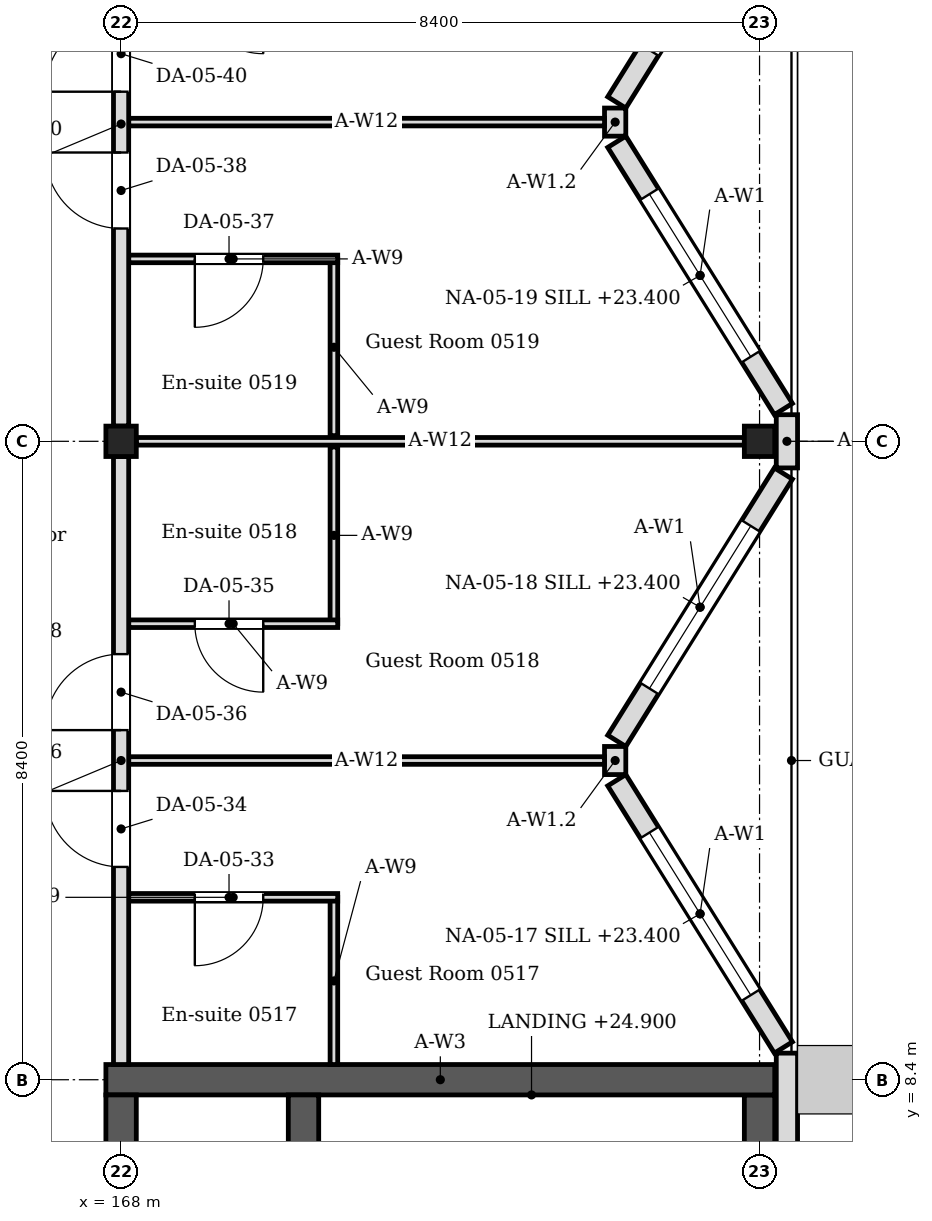
"""IFC4 building model, lengths in metres.
Left out: names, types, materials, properties, quantities, classifications, styles, units other than length and angle.
Written with IfcOpenShell. Run it as: python <this file> out.ifc"""

import sys

from ifc_helpers import new_model, si_unit, direction, frame, frame_2d, origin, origin_2d, place, context, subcontext, project, spatial, rectangle, i_section, extrude, element, fill, save


model = new_model("IFC4")
c1 = context("Model", 3, precision=1e-05, world=origin(), true_north=direction((0.0, 1.0)))
c2 = subcontext(c1, "Body", "Model", "MODEL_VIEW")
j1 = project(units=[si_unit("LENGTHUNIT", "METRE"), si_unit("PLANEANGLEUNIT", "RADIAN")], contexts=[c1])
p1 = place(None, origin())
s1 = spatial("IfcSite", under=j1, at=p1, CompositionType="ELEMENT")
p2 = place(p1, origin())
s2 = spatial("IfcBuilding", under=s1, at=p2, CompositionType="ELEMENT")
p3 = place(p2, frame((0.0, 0.0, 22.8)))
s3 = spatial("IfcBuildingStorey", under=s2, at=p3, CompositionType="ELEMENT", Elevation=22.8)
for number, where, z_axis, x_axis in (
    (1, (168.0, 16.8, 0.0), (0.0, 0.0, 1.0), (1.0, 0.0, 0.0)),
    (2, (176.4, 16.8, 0.0), (0.0, 0.0, 1.0), (1.0, 0.0, 0.0)),
):
    element("IfcColumn", number, at=place(p3, frame(where, z_axis=z_axis, x_axis=x_axis)), inside=s3, PredefinedType="COLUMN", context=c2, shape_type="SweptSolid", body=[
        extrude(i_section(OverallWidth=0.4, OverallDepth=0.4, WebThickness=0.013, FlangeThickness=0.021, FilletRadius=0.022, at=origin_2d()), origin(), (0.0, 0.0, 1.0), 4.2),
    ])
p4 = place(p3, frame((167.8, 8.4, 0.0), z_axis=(0.0, 0.0, 1.0), x_axis=(1.0, 0.0, 0.0)))
e3 = element("IfcWall", 3, at=p4, inside=s3, PredefinedType="SOLIDWALL", context=c2, shape_type="SweptSolid", body=[
    extrude(rectangle(XDim=8.8, YDim=0.4, at=frame_2d((4.4, 0.0))), origin(), (0.0, 0.0, 1.0), 4.05),
])
p5 = place(p3, frame((168.0, 0.2, 0.0), z_axis=(0.0, 0.0, 1.0), x_axis=(0.0, 1.0, 0.0)))
e4 = element("IfcWall", 4, at=p5, inside=s3, PredefinedType="SOLIDWALL", context=c2, shape_type="SweptSolid", body=[
    extrude(rectangle(XDim=8.0, YDim=0.4, at=frame_2d((4.0, 0.0))), origin(), (0.0, 0.0, 1.0), 4.05),
])
p6 = place(p5, frame((1.75, 0.0, 0.0)))
e5 = element("IfcOpeningElement", 5, at=p6, cuts=e4, PredefinedType="OPENING", context=c2, shape_type="SweptSolid", body=[
    extrude(rectangle(XDim=1.0, YDim=2.1, at=frame_2d((0.5, 1.05))), frame((0.0, 0.21, 0.0), z_axis=(0.0, -1.0, 0.0), x_axis=(1.0, 0.0, 0.0)), (0.0, 0.0, 1.0), 0.42),
])
p7 = place(p5, frame((5.675, 0.0, 0.0)))
e6 = element("IfcOpeningElement", 6, at=p7, cuts=e4, PredefinedType="OPENING", context=c2, shape_type="SweptSolid", body=[
    extrude(rectangle(XDim=1.05, YDim=2.1, at=frame_2d((0.525, 1.05))), frame((0.0, 0.21, 0.0), z_axis=(0.0, -1.0, 0.0), x_axis=(1.0, 0.0, 0.0)), (0.0, 0.0, 1.0), 0.42),
])
p8 = place(p3, frame((176.4, 0.2, 0.0), z_axis=(0.0, 0.0, 1.0), x_axis=(0.0, 1.0, 0.0)))
e7 = element("IfcWall", 7, at=p8, inside=s3, PredefinedType="SOLIDWALL", context=c2, shape_type="SweptSolid", body=[
    extrude(rectangle(XDim=8.0, YDim=0.4, at=frame_2d((4.0, 0.0))), origin(), (0.0, 0.0, 1.0), 4.05),
])
p9 = place(p3, frame((176.76, -0.22, 0.0), z_axis=(0.0, 0.0, 1.0), x_axis=(0.0, 1.0, 0.0)))
e8 = element("IfcWall", 8, at=p9, inside=s3, PredefinedType="SOLIDWALL", context=c2, shape_type="SweptSolid", body=[
    extrude(rectangle(XDim=8.97, YDim=0.28, at=frame_2d((4.485, 0.0))), origin(), (0.0, 0.0, 1.0), 4.05),
])
p10 = place(p3, frame((176.714, 8.824, 0.0), z_axis=(0.0, 0.0, 1.0), x_axis=(-0.529018946142, 0.848610013271, 0.0)))
e9 = element("IfcWall", 9, at=p10, inside=s3, PredefinedType="SOLIDWALL", context=c2, shape_type="SweptSolid", body=[
    extrude(rectangle(XDim=4.144, YDim=0.28, at=frame_2d((2.072, 0.0))), origin(), (0.0, 0.0, 1.0), 4.05),
])
p11 = place(p10, frame((0.812, 0.0, 0.6)))
e10 = element("IfcOpeningElement", 10, at=p11, cuts=e9, PredefinedType="OPENING", context=c2, shape_type="SweptSolid", body=[
    extrude(rectangle(XDim=2.52, YDim=2.4, at=frame_2d((1.26, 1.2))), frame((0.0, 0.15, 0.0), z_axis=(0.0, -1.0, 0.0), x_axis=(1.0, 0.0, 0.0)), (0.0, 0.0, 1.0), 0.3),
])
p12 = place(p3, frame((174.521, 12.859, 0.0), z_axis=(0.0, 0.0, 1.0), x_axis=(0.528992500338, 0.848626498871, 0.0)))
e11 = element("IfcWall", 11, at=p12, inside=s3, PredefinedType="SOLIDWALL", context=c2, shape_type="SweptSolid", body=[
    extrude(rectangle(XDim=4.145, YDim=0.28, at=frame_2d((2.072, 0.0))), origin(), (0.0, 0.0, 1.0), 4.05),
])
p13 = place(p12, frame((0.812, 0.0, 0.6)))
e12 = element("IfcOpeningElement", 12, at=p13, cuts=e11, PredefinedType="OPENING", context=c2, shape_type="SweptSolid", body=[
    extrude(rectangle(XDim=2.52, YDim=2.4, at=frame_2d((1.26, 1.2))), frame((0.0, 0.15, 0.0), z_axis=(0.0, -1.0, 0.0), x_axis=(1.0, 0.0, 0.0)), (0.0, 0.0, 1.0), 0.3),
])
p14 = place(p3, frame((174.5, 12.415, 0.0), z_axis=(0.0, 0.0, 1.0), x_axis=(0.0, 1.0, 0.0)))
e13 = element("IfcWall", 13, at=p14, inside=s3, PredefinedType="SOLIDWALL", context=c2, shape_type="SweptSolid", body=[
    extrude(rectangle(XDim=0.37, YDim=0.28, at=frame_2d((0.185, 0.0))), origin(), (0.0, 0.0, 1.0), 3.604),
])
p15 = place(p3, frame((176.76, 16.45, 0.0), z_axis=(0.0, 0.0, 1.0), x_axis=(0.0, 1.0, 0.0)))
e14 = element("IfcWall", 14, at=p15, inside=s3, PredefinedType="SOLIDWALL", context=c2, shape_type="SweptSolid", body=[
    extrude(rectangle(XDim=0.7, YDim=0.28, at=frame_2d((0.35, 0.0))), origin(), (0.0, 0.0, 1.0), 4.05),
])
p16 = place(p3, frame((176.714, 17.224, 0.0), z_axis=(0.0, 0.0, 1.0), x_axis=(-0.529018946142, 0.848610013271, 0.0)))
e15 = element("IfcWall", 15, at=p16, inside=s3, PredefinedType="SOLIDWALL", context=c2, shape_type="SweptSolid", body=[
    extrude(rectangle(XDim=4.144, YDim=0.28, at=frame_2d((2.072, 0.0))), origin(), (0.0, 0.0, 1.0), 4.05),
])
p17 = place(p16, frame((0.812, 0.0, 0.6)))
e16 = element("IfcOpeningElement", 16, at=p17, cuts=e15, PredefinedType="OPENING", context=c2, shape_type="SweptSolid", body=[
    extrude(rectangle(XDim=2.52, YDim=2.4, at=frame_2d((1.26, 1.2))), frame((0.0, 0.15, 0.0), z_axis=(0.0, -1.0, 0.0), x_axis=(1.0, 0.0, 0.0)), (0.0, 0.0, 1.0), 0.3),
])
p18 = place(p3, frame((174.521, 21.259, 0.0), z_axis=(0.0, 0.0, 1.0), x_axis=(0.529018946142, 0.848610013271, 0.0)))
e17 = element("IfcWall", 17, at=p18, inside=s3, PredefinedType="SOLIDWALL", context=c2, shape_type="SweptSolid", body=[
    extrude(rectangle(XDim=4.144, YDim=0.28, at=frame_2d((2.072, 0.0))), origin(), (0.0, 0.0, 1.0), 4.05),
])
p19 = place(p18, frame((0.812, 0.0, 0.6)))
e18 = element("IfcOpeningElement", 18, at=p19, cuts=e17, PredefinedType="OPENING", context=c2, shape_type="SweptSolid", body=[
    extrude(rectangle(XDim=2.52, YDim=2.4, at=frame_2d((1.26, 1.2))), frame((0.0, 0.15, 0.0), z_axis=(0.0, -1.0, 0.0), x_axis=(1.0, 0.0, 0.0)), (0.0, 0.0, 1.0), 0.3),
])
p20 = place(p3, frame((174.5, 20.815, 0.0), z_axis=(0.0, 0.0, 1.0), x_axis=(0.0, 1.0, 0.0)))
e19 = element("IfcWall", 19, at=p20, inside=s3, PredefinedType="SOLIDWALL", context=c2, shape_type="SweptSolid", body=[
    extrude(rectangle(XDim=0.37, YDim=0.28, at=frame_2d((0.185, 0.0))), origin(), (0.0, 0.0, 1.0), 3.604),
])
p21 = place(p3, frame((170.8, 8.6, 0.0), z_axis=(0.0, 0.0, 1.0), x_axis=(0.0, 1.0, 0.0)))
e20 = element("IfcWall", 20, at=p21, inside=s3, PredefinedType="PARTITIONING", context=c2, shape_type="SweptSolid", body=[
    extrude(rectangle(XDim=2.2, YDim=0.1, at=frame_2d((1.1, 0.0))), origin(), (0.0, 0.0, 1.0), 4.05),
])
p22 = place(p3, frame((170.85, 10.8, 0.0), z_axis=(0.0, 0.0, 1.0), x_axis=(-1.0, 0.0, 0.0)))
e21 = element("IfcWall", 21, at=p22, inside=s3, PredefinedType="PARTITIONING", context=c2, shape_type="SweptSolid", body=[
    extrude(rectangle(XDim=2.75, YDim=0.1, at=frame_2d((1.375, 0.0))), origin(), (0.0, 0.0, 1.0), 4.05),
])
p23 = place(p22, frame((0.98, 0.0, 0.0)))
e22 = element("IfcOpeningElement", 22, at=p23, cuts=e21, PredefinedType="OPENING", context=c2, shape_type="SweptSolid", body=[
    extrude(rectangle(XDim=0.9, YDim=2.1, at=frame_2d((0.45, 1.05))), frame((0.0, 0.06, 0.0), z_axis=(0.0, -1.0, 0.0), x_axis=(1.0, 0.0, 0.0)), (0.0, 0.0, 1.0), 0.12),
])
p24 = place(p3, frame((170.8, 14.4, 0.0), z_axis=(0.0, 0.0, 1.0), x_axis=(0.0, 1.0, 0.0)))
e23 = element("IfcWall", 23, at=p24, inside=s3, PredefinedType="PARTITIONING", context=c2, shape_type="SweptSolid", body=[
    extrude(rectangle(XDim=2.325, YDim=0.1, at=frame_2d((1.163, 0.0))), origin(), (0.0, 0.0, 1.0), 4.05),
])
p25 = place(p3, frame((170.85, 14.4, 0.0), z_axis=(0.0, 0.0, 1.0), x_axis=(-1.0, 0.0, 0.0)))
e24 = element("IfcWall", 24, at=p25, inside=s3, PredefinedType="PARTITIONING", context=c2, shape_type="SweptSolid", body=[
    extrude(rectangle(XDim=2.75, YDim=0.1, at=frame_2d((1.375, 0.0))), origin(), (0.0, 0.0, 1.0), 4.05),
])
p26 = place(p25, frame((0.98, 0.0, 0.0)))
e25 = element("IfcOpeningElement", 25, at=p26, cuts=e24, PredefinedType="OPENING", context=c2, shape_type="SweptSolid", body=[
    extrude(rectangle(XDim=0.9, YDim=2.1, at=frame_2d((0.45, 1.05))), frame((0.0, 0.06, 0.0), z_axis=(0.0, -1.0, 0.0), x_axis=(1.0, 0.0, 0.0)), (0.0, 0.0, 1.0), 0.12),
])
p27 = place(p3, frame((170.8, 16.875, 0.0), z_axis=(0.0, 0.0, 1.0), x_axis=(0.0, 1.0, 0.0)))
e26 = element("IfcWall", 26, at=p27, inside=s3, PredefinedType="PARTITIONING", context=c2, shape_type="SweptSolid", body=[
    extrude(rectangle(XDim=2.325, YDim=0.1, at=frame_2d((1.163, 0.0))), origin(), (0.0, 0.0, 1.0), 4.05),
])
p28 = place(p3, frame((170.85, 19.2, 0.0), z_axis=(0.0, 0.0, 1.0), x_axis=(-1.0, 0.0, 0.0)))
e27 = element("IfcWall", 27, at=p28, inside=s3, PredefinedType="PARTITIONING", context=c2, shape_type="SweptSolid", body=[
    extrude(rectangle(XDim=2.75, YDim=0.1, at=frame_2d((1.375, 0.0))), origin(), (0.0, 0.0, 1.0), 4.05),
])
p29 = place(p28, frame((0.98, 0.0, 0.0)))
e28 = element("IfcOpeningElement", 28, at=p29, cuts=e27, PredefinedType="OPENING", context=c2, shape_type="SweptSolid", body=[
    extrude(rectangle(XDim=0.9, YDim=2.1, at=frame_2d((0.45, 1.05))), frame((0.0, 0.06, 0.0), z_axis=(0.0, -1.0, 0.0), x_axis=(1.0, 0.0, 0.0)), (0.0, 0.0, 1.0), 0.12),
])
p30 = place(p3, frame((168.2, 16.8, 0.0), z_axis=(0.0, 0.0, 1.0), x_axis=(1.0, 0.0, 0.0)))
e29 = element("IfcWall", 29, at=p30, inside=s3, PredefinedType="PARTITIONING", context=c2, shape_type="SweptSolid", body=[
    extrude(rectangle(XDim=8.0, YDim=0.1, at=frame_2d((4.0, 0.0))), origin(), (0.0, 0.0, 1.0), 3.604),
])
for number, where, z_axis, x_axis in (
    (30, (168.1, 12.6, 0.0), (0.0, 0.0, 1.0), (1.0, 0.0, 0.0)),
    (31, (168.1, 21.0, 0.0), (0.0, 0.0, 1.0), (1.0, 0.0, 0.0)),
):
    element("IfcWall", number, at=place(p3, frame(where, z_axis=z_axis, x_axis=x_axis)), inside=s3, PredefinedType="PARTITIONING", context=c2, shape_type="SweptSolid", body=[
        extrude(rectangle(XDim=6.26, YDim=0.1, at=frame_2d((3.13, 0.0))), origin(), (0.0, 0.0, 1.0), 3.604),
    ])
p31 = place(p3, frame((168.0, 8.6, 0.0), z_axis=(0.0, 0.0, 1.0), x_axis=(0.0, 1.0, 0.0)))
e32 = element("IfcWall", 32, at=p31, inside=s3, PredefinedType="PARTITIONING", context=c2, shape_type="SweptSolid", body=[
    extrude(rectangle(XDim=8.0, YDim=0.2, at=frame_2d((4.0, 0.0))), origin(), (0.0, 0.0, 1.0), 3.45),
])
p32 = place(p31, frame((2.6, 0.0, 0.0)))
e33 = element("IfcOpeningElement", 33, at=p32, cuts=e32, PredefinedType="OPENING", context=c2, shape_type="SweptSolid", body=[
    extrude(rectangle(XDim=1.0, YDim=2.4, at=frame_2d((0.5, 1.2))), frame((0.0, 0.11, 0.0), z_axis=(0.0, -1.0, 0.0), x_axis=(1.0, 0.0, 0.0)), (0.0, 0.0, 1.0), 0.22),
])
p33 = place(p31, frame((4.4, 0.0, 0.0)))
e34 = element("IfcOpeningElement", 34, at=p33, cuts=e32, PredefinedType="OPENING", context=c2, shape_type="SweptSolid", body=[
    extrude(rectangle(XDim=1.0, YDim=2.4, at=frame_2d((0.5, 1.2))), frame((0.0, 0.11, 0.0), z_axis=(0.0, -1.0, 0.0), x_axis=(1.0, 0.0, 0.0)), (0.0, 0.0, 1.0), 0.22),
])
p34 = place(p3, frame((168.0, 17.0, 0.0), z_axis=(0.0, 0.0, 1.0), x_axis=(0.0, 1.0, 0.0)))
e35 = element("IfcWall", 35, at=p34, inside=s3, PredefinedType="PARTITIONING", context=c2, shape_type="SweptSolid", body=[
    extrude(rectangle(XDim=7.95, YDim=0.2, at=frame_2d((3.975, 0.0))), origin(), (0.0, 0.0, 1.0), 3.45),
])
p35 = place(p34, frame((2.6, 0.0, 0.0)))
e36 = element("IfcOpeningElement", 36, at=p35, cuts=e35, PredefinedType="OPENING", context=c2, shape_type="SweptSolid", body=[
    extrude(rectangle(XDim=1.0, YDim=2.4, at=frame_2d((0.5, 1.2))), frame((0.0, 0.11, 0.0), z_axis=(0.0, -1.0, 0.0), x_axis=(1.0, 0.0, 0.0)), (0.0, 0.0, 1.0), 0.22),
])
p36 = place(p34, frame((4.4, 0.0, 0.0)))
e37 = element("IfcOpeningElement", 37, at=p36, cuts=e35, PredefinedType="OPENING", context=c2, shape_type="SweptSolid", body=[
    extrude(rectangle(XDim=1.0, YDim=2.4, at=frame_2d((0.5, 1.2))), frame((0.0, 0.11, 0.0), z_axis=(0.0, -1.0, 0.0), x_axis=(1.0, 0.0, 0.0)), (0.0, 0.0, 1.0), 0.22),
])
p37 = place(p3, frame((170.4, 0.2, 0.0), z_axis=(0.0, 0.0, 1.0), x_axis=(0.0, 1.0, 0.0)))
e38 = element("IfcWall", 38, at=p37, inside=s3, PredefinedType="SOLIDWALL", context=c2, shape_type="SweptSolid", body=[
    extrude(rectangle(XDim=8.0, YDim=0.4, at=frame_2d((4.0, 0.0))), origin(), (0.0, 0.0, 1.0), 4.05),
])
p38 = place(p37, frame((0.3, 0.0, 0.0)))
e39 = element("IfcOpeningElement", 39, at=p38, cuts=e38, PredefinedType="OPENING", context=c2, shape_type="SweptSolid", body=[
    extrude(rectangle(XDim=0.9, YDim=2.1, at=frame_2d((0.45, 1.05))), frame((0.0, 0.21, 0.0), z_axis=(0.0, -1.0, 0.0), x_axis=(1.0, 0.0, 0.0)), (0.0, 0.0, 1.0), 0.42),
])
p39 = place(p11, origin())
e40 = element("IfcWindow", 40, at=p39, inside=s3, PartitioningType="SINGLE_PANEL", PredefinedType="WINDOW", context=c2, shape_type="SweptSolid", body=[
    extrude(rectangle(XDim=2.52, YDim=2.4, at=frame_2d((1.26, 1.2))), frame((0.0, 0.03, 0.0), z_axis=(0.0, -1.0, 0.0), x_axis=(1.0, 0.0, 0.0)), (0.0, 0.0, 1.0), 0.06),
])
fill(e10, e40)
p40 = place(p13, origin())
e41 = element("IfcWindow", 41, at=p40, inside=s3, PartitioningType="SINGLE_PANEL", PredefinedType="WINDOW", context=c2, shape_type="SweptSolid", body=[
    extrude(rectangle(XDim=2.52, YDim=2.4, at=frame_2d((1.26, 1.2))), frame((0.0, 0.03, 0.0), z_axis=(0.0, -1.0, 0.0), x_axis=(1.0, 0.0, 0.0)), (0.0, 0.0, 1.0), 0.06),
])
fill(e12, e41)
p41 = place(p17, origin())
e42 = element("IfcWindow", 42, at=p41, inside=s3, PartitioningType="SINGLE_PANEL", PredefinedType="WINDOW", context=c2, shape_type="SweptSolid", body=[
    extrude(rectangle(XDim=2.52, YDim=2.4, at=frame_2d((1.26, 1.2))), frame((0.0, 0.03, 0.0), z_axis=(0.0, -1.0, 0.0), x_axis=(1.0, 0.0, 0.0)), (0.0, 0.0, 1.0), 0.06),
])
fill(e16, e42)
p42 = place(p23, origin())
e43 = element("IfcDoor", 43, at=p42, inside=s3, OperationType="SINGLE_SWING_RIGHT", PredefinedType="DOOR", context=c2, shape_type="SweptSolid", body=[
    extrude(rectangle(XDim=0.9, YDim=2.1, at=frame_2d((0.45, 1.05))), frame((0.0, 0.025, 0.0), z_axis=(0.0, -1.0, 0.0), x_axis=(1.0, 0.0, 0.0)), (0.0, 0.0, 1.0), 0.05),
])
fill(e22, e43)
p43 = place(p32, origin())
e44 = element("IfcDoor", 44, at=p43, inside=s3, OperationType="SINGLE_SWING_RIGHT", PredefinedType="DOOR", context=c2, shape_type="SweptSolid", body=[
    extrude(rectangle(XDim=1.0, YDim=2.4, at=frame_2d((0.5, 1.2))), frame((0.0, 0.025, 0.0), z_axis=(0.0, -1.0, 0.0), x_axis=(1.0, 0.0, 0.0)), (0.0, 0.0, 1.0), 0.05),
])
fill(e33, e44)
p44 = place(p26, origin())
e45 = element("IfcDoor", 45, at=p44, inside=s3, OperationType="SINGLE_SWING_LEFT", PredefinedType="DOOR", context=c2, shape_type="SweptSolid", body=[
    extrude(rectangle(XDim=0.9, YDim=2.1, at=frame_2d((0.45, 1.05))), frame((0.0, 0.025, 0.0), z_axis=(0.0, -1.0, 0.0), x_axis=(1.0, 0.0, 0.0)), (0.0, 0.0, 1.0), 0.05),
])
fill(e25, e45)
p45 = place(p33, origin())
e46 = element("IfcDoor", 46, at=p45, inside=s3, OperationType="SINGLE_SWING_LEFT", PredefinedType="DOOR", context=c2, shape_type="SweptSolid", body=[
    extrude(rectangle(XDim=1.0, YDim=2.4, at=frame_2d((0.5, 1.2))), frame((0.0, 0.025, 0.0), z_axis=(0.0, -1.0, 0.0), x_axis=(1.0, 0.0, 0.0)), (0.0, 0.0, 1.0), 0.05),
])
fill(e34, e46)
p46 = place(p29, origin())
e47 = element("IfcDoor", 47, at=p46, inside=s3, OperationType="SINGLE_SWING_RIGHT", PredefinedType="DOOR", context=c2, shape_type="SweptSolid", body=[
    extrude(rectangle(XDim=0.9, YDim=2.1, at=frame_2d((0.45, 1.05))), frame((0.0, 0.025, 0.0), z_axis=(0.0, -1.0, 0.0), x_axis=(1.0, 0.0, 0.0)), (0.0, 0.0, 1.0), 0.05),
])
fill(e28, e47)
p47 = place(p35, origin())
e48 = element("IfcDoor", 48, at=p47, inside=s3, OperationType="SINGLE_SWING_RIGHT", PredefinedType="DOOR", context=c2, shape_type="SweptSolid", body=[
    extrude(rectangle(XDim=1.0, YDim=2.4, at=frame_2d((0.5, 1.2))), frame((0.0, 0.025, 0.0), z_axis=(0.0, -1.0, 0.0), x_axis=(1.0, 0.0, 0.0)), (0.0, 0.0, 1.0), 0.05),
])
fill(e36, e48)
p48 = place(p36, origin())
e49 = element("IfcDoor", 49, at=p48, inside=s3, OperationType="SINGLE_SWING_LEFT", PredefinedType="DOOR", context=c2, shape_type="SweptSolid", body=[
    extrude(rectangle(XDim=1.0, YDim=2.4, at=frame_2d((0.5, 1.2))), frame((0.0, 0.025, 0.0), z_axis=(0.0, -1.0, 0.0), x_axis=(1.0, 0.0, 0.0)), (0.0, 0.0, 1.0), 0.05),
])
fill(e37, e49)
save(model, sys.argv[1])
